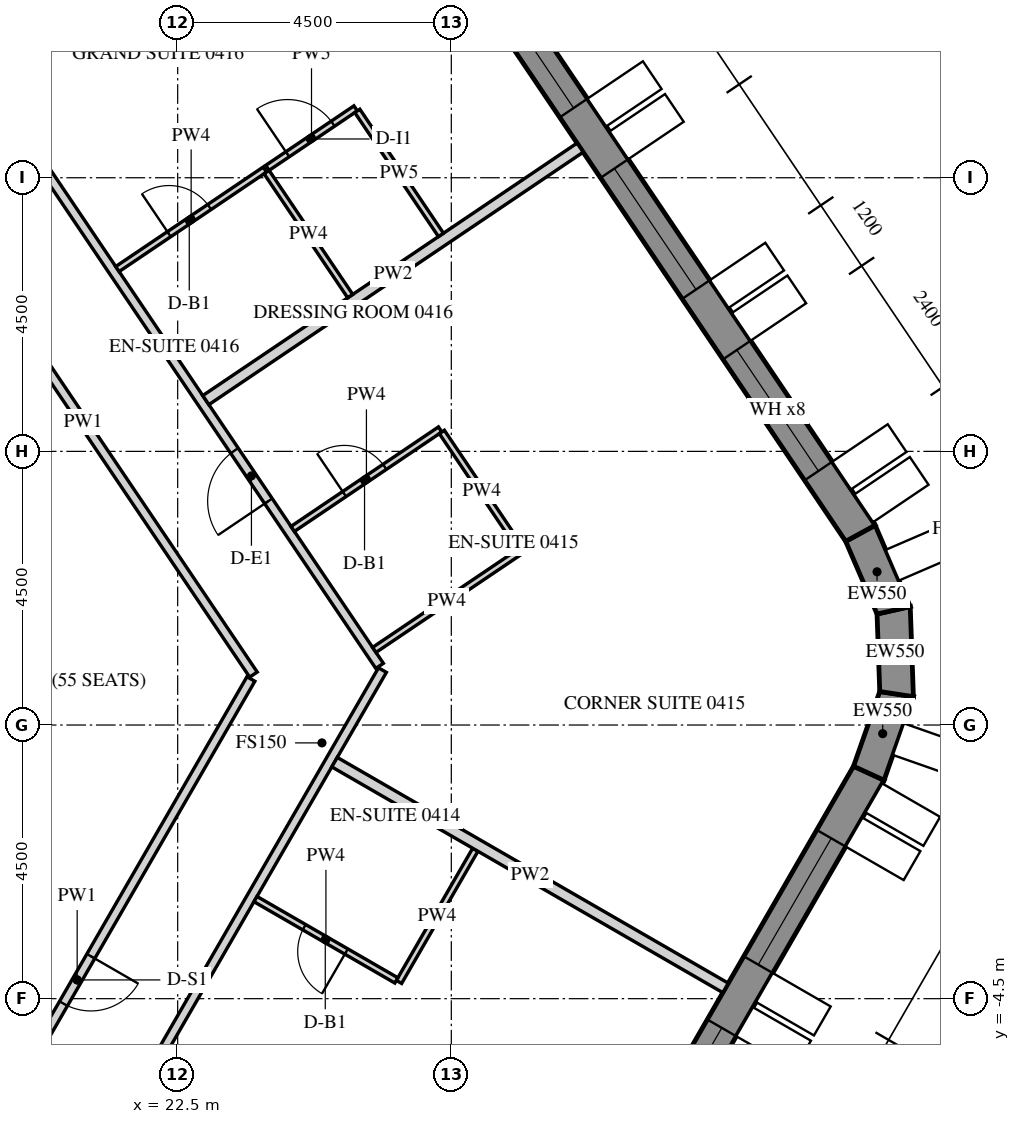
"""IFC4 building model, lengths in metres.
Left out: names, types, materials, properties, quantities, classifications, styles, units other than length and angle.
Written with IfcOpenShell. Run it as: python <this file> out.ifc"""

import sys

from ifc_helpers import new_model, si_unit, direction, frame, frame_2d, origin, place, context, subcontext, project, spatial, polyline, rectangle, outline, extrude, element, fill, save


model = new_model("IFC4")
c1 = context("Model", 3, precision=1e-05, world=origin(), true_north=direction((0.0, 1.0)))
c2 = subcontext(c1, "Body", "Model", "MODEL_VIEW")
j1 = project(units=[si_unit("LENGTHUNIT", "METRE"), si_unit("PLANEANGLEUNIT", "RADIAN")], contexts=[c1])
p1 = place(None, origin())
s1 = spatial("IfcSite", under=j1, at=p1, CompositionType="ELEMENT")
p2 = place(p1, origin())
s2 = spatial("IfcBuilding", under=s1, at=p2, CompositionType="ELEMENT")
p3 = place(p2, frame((0.0, 0.0, 68.7)))
s3 = spatial("IfcBuildingStorey", under=s2, at=p3, CompositionType="ELEMENT", Elevation=68.7)
p4 = place(p3, frame((18.83, -26.835, -0.15), z_axis=(0.0, 0.0, 1.0), x_axis=(0.500003800416, 0.866023209602, 0.0)))
e1 = element("IfcWall", 1, at=p4, inside=s3, PredefinedType="SOLIDWALL", context=c2, shape_type="SweptSolid", body=[
    extrude(outline(polyline([(-0.022, -0.275), (30.097, -0.275), (30.045, 0.275), (0.022, 0.275), (-0.022, -0.275)])), origin(), (0.0, 0.0, 1.0), 3.9),
])
p5 = place(p4, frame((1.236, 0.0, 1.05)))
e2 = element("IfcOpeningElement", 2, at=p5, cuts=e1, PredefinedType="OPENING", context=c2, shape_type="SweptSolid", body=[
    extrude(rectangle(XDim=2.4, YDim=2.4, at=frame_2d((1.2, 1.2))), frame((0.0, 0.285, 0.0), z_axis=(0.0, -1.0, 0.0), x_axis=(1.0, 0.0, 0.0)), (0.0, 0.0, 1.0), 0.57),
])
p6 = place(p4, frame((4.835, 0.0, 1.05)))
e3 = element("IfcOpeningElement", 3, at=p6, cuts=e1, PredefinedType="OPENING", context=c2, shape_type="SweptSolid", body=[
    extrude(rectangle(XDim=2.4, YDim=2.4, at=frame_2d((1.2, 1.2))), frame((0.0, 0.285, 0.0), z_axis=(0.0, -1.0, 0.0), x_axis=(1.0, 0.0, 0.0)), (0.0, 0.0, 1.0), 0.57),
])
p7 = place(p4, frame((8.436, 0.0, 1.05)))
e4 = element("IfcOpeningElement", 4, at=p7, cuts=e1, PredefinedType="OPENING", context=c2, shape_type="SweptSolid", body=[
    extrude(rectangle(XDim=2.4, YDim=2.4, at=frame_2d((1.2, 1.2))), frame((0.0, 0.285, 0.0), z_axis=(0.0, -1.0, 0.0), x_axis=(1.0, 0.0, 0.0)), (0.0, 0.0, 1.0), 0.57),
])
p8 = place(p4, frame((12.035, 0.0, 1.05)))
e5 = element("IfcOpeningElement", 5, at=p8, cuts=e1, PredefinedType="OPENING", context=c2, shape_type="SweptSolid", body=[
    extrude(rectangle(XDim=2.4, YDim=2.4, at=frame_2d((1.2, 1.2))), frame((0.0, 0.285, 0.0), z_axis=(0.0, -1.0, 0.0), x_axis=(1.0, 0.0, 0.0)), (0.0, 0.0, 1.0), 0.57),
])
p9 = place(p4, frame((15.635, 0.0, 1.05)))
e6 = element("IfcOpeningElement", 6, at=p9, cuts=e1, PredefinedType="OPENING", context=c2, shape_type="SweptSolid", body=[
    extrude(rectangle(XDim=2.4, YDim=2.4, at=frame_2d((1.2, 1.2))), frame((0.0, 0.285, 0.0), z_axis=(0.0, -1.0, 0.0), x_axis=(1.0, 0.0, 0.0)), (0.0, 0.0, 1.0), 0.57),
])
p10 = place(p4, frame((19.236, 0.0, 1.05)))
e7 = element("IfcOpeningElement", 7, at=p10, cuts=e1, PredefinedType="OPENING", context=c2, shape_type="SweptSolid", body=[
    extrude(rectangle(XDim=2.4, YDim=2.4, at=frame_2d((1.2, 1.2))), frame((0.0, 0.285, 0.0), z_axis=(0.0, -1.0, 0.0), x_axis=(1.0, 0.0, 0.0)), (0.0, 0.0, 1.0), 0.57),
])
p11 = place(p4, frame((22.835, 0.0, 1.05)))
e8 = element("IfcOpeningElement", 8, at=p11, cuts=e1, PredefinedType="OPENING", context=c2, shape_type="SweptSolid", body=[
    extrude(rectangle(XDim=2.4, YDim=2.4, at=frame_2d((1.2, 1.2))), frame((0.0, 0.285, 0.0), z_axis=(0.0, -1.0, 0.0), x_axis=(1.0, 0.0, 0.0)), (0.0, 0.0, 1.0), 0.57),
])
p12 = place(p4, frame((26.436, 0.0, 1.05)))
e9 = element("IfcOpeningElement", 9, at=p12, cuts=e1, PredefinedType="OPENING", context=c2, shape_type="SweptSolid", body=[
    extrude(rectangle(XDim=2.4, YDim=2.4, at=frame_2d((1.2, 1.2))), frame((0.0, 0.285, 0.0), z_axis=(0.0, -1.0, 0.0), x_axis=(1.0, 0.0, 0.0)), (0.0, 0.0, 1.0), 0.57),
])
p13 = place(p3, frame((33.866, -0.792, -0.15), z_axis=(0.0, 0.0, 1.0), x_axis=(0.33111537203, 0.943590276765, 0.0)))
e10 = element("IfcWall", 10, at=p13, inside=s3, PredefinedType="SOLIDWALL", context=c2, shape_type="SweptSolid", body=[
    extrude(outline(polyline([(-0.026, -0.275), (1.431, -0.275), (1.327, 0.275), (0.026, 0.275), (-0.026, -0.275)])), origin(), (0.0, 0.0, 1.0), 3.9),
])
p14 = place(p3, frame((34.323, 0.509, -0.15), z_axis=(0.0, 0.0, 1.0), x_axis=(-0.034876908462, 0.999391615562, 0.0)))
e11 = element("IfcWall", 11, at=p14, inside=s3, PredefinedType="SOLIDWALL", context=c2, shape_type="SweptSolid", body=[
    extrude(outline(polyline([(-0.052, -0.275), (1.431, -0.275), (1.327, 0.275), (0.052, 0.275), (-0.052, -0.275)])), origin(), (0.0, 0.0, 1.0), 3.9),
])
p15 = place(p3, frame((34.274, 1.887, -0.15), z_axis=(0.0, 0.0, 1.0), x_axis=(-0.396161342798, 0.918180913803, 0.0)))
e12 = element("IfcWall", 12, at=p15, inside=s3, PredefinedType="SOLIDWALL", context=c2, shape_type="SweptSolid", body=[
    extrude(outline(polyline([(-0.052, -0.275), (1.405, -0.275), (1.354, 0.275), (0.052, 0.275), (-0.052, -0.275)])), origin(), (0.0, 0.0, 1.0), 3.9),
])
p16 = place(p3, frame((33.728, 3.153, -0.15), z_axis=(0.0, 0.0, 1.0), x_axis=(-0.559192411416, 0.82903790445, 0.0)))
e13 = element("IfcWall", 13, at=p16, inside=s3, PredefinedType="SOLIDWALL", context=c2, shape_type="SweptSolid", body=[
    extrude(outline(polyline([(-0.026, -0.275), (30.093, -0.275), (30.048, 0.275), (0.026, 0.275), (-0.026, -0.275)])), origin(), (0.0, 0.0, 1.0), 3.9),
])
p17 = place(p16, frame((1.236, 0.0, 1.05)))
e14 = element("IfcOpeningElement", 14, at=p17, cuts=e13, PredefinedType="OPENING", context=c2, shape_type="SweptSolid", body=[
    extrude(rectangle(XDim=2.4, YDim=2.4, at=frame_2d((1.2, 1.2))), frame((0.0, 0.285, 0.0), z_axis=(0.0, -1.0, 0.0), x_axis=(1.0, 0.0, 0.0)), (0.0, 0.0, 1.0), 0.57),
])
p18 = place(p16, frame((4.835, 0.0, 1.05)))
e15 = element("IfcOpeningElement", 15, at=p18, cuts=e13, PredefinedType="OPENING", context=c2, shape_type="SweptSolid", body=[
    extrude(rectangle(XDim=2.4, YDim=2.4, at=frame_2d((1.2, 1.2))), frame((0.0, 0.285, 0.0), z_axis=(0.0, -1.0, 0.0), x_axis=(1.0, 0.0, 0.0)), (0.0, 0.0, 1.0), 0.57),
])
p19 = place(p16, frame((8.436, 0.0, 1.05)))
e16 = element("IfcOpeningElement", 16, at=p19, cuts=e13, PredefinedType="OPENING", context=c2, shape_type="SweptSolid", body=[
    extrude(rectangle(XDim=2.4, YDim=2.4, at=frame_2d((1.2, 1.2))), frame((0.0, 0.285, 0.0), z_axis=(0.0, -1.0, 0.0), x_axis=(1.0, 0.0, 0.0)), (0.0, 0.0, 1.0), 0.57),
])
p20 = place(p16, frame((12.035, 0.0, 1.05)))
e17 = element("IfcOpeningElement", 17, at=p20, cuts=e13, PredefinedType="OPENING", context=c2, shape_type="SweptSolid", body=[
    extrude(rectangle(XDim=2.4, YDim=2.4, at=frame_2d((1.2, 1.2))), frame((0.0, 0.285, 0.0), z_axis=(0.0, -1.0, 0.0), x_axis=(1.0, 0.0, 0.0)), (0.0, 0.0, 1.0), 0.57),
])
p21 = place(p16, frame((15.635, 0.0, 1.05)))
e18 = element("IfcOpeningElement", 18, at=p21, cuts=e13, PredefinedType="OPENING", context=c2, shape_type="SweptSolid", body=[
    extrude(rectangle(XDim=2.4, YDim=2.4, at=frame_2d((1.2, 1.2))), frame((0.0, 0.285, 0.0), z_axis=(0.0, -1.0, 0.0), x_axis=(1.0, 0.0, 0.0)), (0.0, 0.0, 1.0), 0.57),
])
p22 = place(p16, frame((19.236, 0.0, 1.05)))
e19 = element("IfcOpeningElement", 19, at=p22, cuts=e13, PredefinedType="OPENING", context=c2, shape_type="SweptSolid", body=[
    extrude(rectangle(XDim=2.4, YDim=2.4, at=frame_2d((1.2, 1.2))), frame((0.0, 0.285, 0.0), z_axis=(0.0, -1.0, 0.0), x_axis=(1.0, 0.0, 0.0)), (0.0, 0.0, 1.0), 0.57),
])
p23 = place(p16, frame((22.835, 0.0, 1.05)))
e20 = element("IfcOpeningElement", 20, at=p23, cuts=e13, PredefinedType="OPENING", context=c2, shape_type="SweptSolid", body=[
    extrude(rectangle(XDim=2.4, YDim=2.4, at=frame_2d((1.2, 1.2))), frame((0.0, 0.285, 0.0), z_axis=(0.0, -1.0, 0.0), x_axis=(1.0, 0.0, 0.0)), (0.0, 0.0, 1.0), 0.57),
])
p24 = place(p16, frame((26.436, 0.0, 1.05)))
e21 = element("IfcOpeningElement", 21, at=p24, cuts=e13, PredefinedType="OPENING", context=c2, shape_type="SweptSolid", body=[
    extrude(rectangle(XDim=2.4, YDim=2.4, at=frame_2d((1.2, 1.2))), frame((0.0, 0.285, 0.0), z_axis=(0.0, -1.0, 0.0), x_axis=(1.0, 0.0, 0.0)), (0.0, 0.0, 1.0), 0.57),
])
p25 = place(p3, frame((13.928, -19.775, 0.0), z_axis=(0.0, 0.0, 1.0), x_axis=(0.50000450071, 0.866022805283, 0.0)))
e22 = element("IfcWall", 22, at=p25, inside=s3, PredefinedType="PARTITIONING", context=c2, shape_type="SweptSolid", body=[
    extrude(rectangle(XDim=23.877, YDim=0.15, at=frame_2d((11.938, 0.0))), origin(), (0.0, 0.0, 1.0), 2.988),
])
p26 = place(p25, frame((3.943, 0.0, 0.0)))
e23 = element("IfcOpeningElement", 23, at=p26, cuts=e22, PredefinedType="OPENING", context=c2, shape_type="SweptSolid", body=[
    extrude(rectangle(XDim=1.0, YDim=2.1, at=frame_2d((0.5, 1.05))), frame((0.0, 0.085, 0.0), z_axis=(0.0, -1.0, 0.0), x_axis=(1.0, 0.0, 0.0)), (0.0, 0.0, 1.0), 0.17),
])
p27 = place(p25, frame((14.972, 0.0, 0.0)))
e24 = element("IfcOpeningElement", 24, at=p27, cuts=e22, PredefinedType="OPENING", context=c2, shape_type="SweptSolid", body=[
    extrude(rectangle(XDim=1.0, YDim=2.1, at=frame_2d((0.5, 1.05))), frame((0.0, 0.085, 0.0), z_axis=(0.0, -1.0, 0.0), x_axis=(1.0, 0.0, 0.0)), (0.0, 0.0, 1.0), 0.17),
])
p28 = place(p3, frame((25.821, 0.972, 0.0), z_axis=(0.0, 0.0, 1.0), x_axis=(-0.559193816298, 0.829036956845, 0.0)))
e25 = element("IfcWall", 25, at=p28, inside=s3, PredefinedType="PARTITIONING", context=c2, shape_type="SweptSolid", body=[
    extrude(rectangle(XDim=22.002, YDim=0.15, at=frame_2d((11.001, 0.0))), origin(), (0.0, 0.0, 1.0), 2.988),
])
p29 = place(p28, frame((3.269, 0.0, 0.0)))
e26 = element("IfcOpeningElement", 26, at=p29, cuts=e25, PredefinedType="OPENING", context=c2, shape_type="SweptSolid", body=[
    extrude(rectangle(XDim=1.0, YDim=2.1, at=frame_2d((0.5, 1.05))), frame((0.0, 0.085, 0.0), z_axis=(0.0, -1.0, 0.0), x_axis=(1.0, 0.0, 0.0)), (0.0, 0.0, 1.0), 0.17),
])
p30 = place(p28, frame((13.221, 0.0, 0.0)))
e27 = element("IfcOpeningElement", 27, at=p30, cuts=e25, PredefinedType="OPENING", context=c2, shape_type="SweptSolid", body=[
    extrude(rectangle(XDim=1.0, YDim=2.1, at=frame_2d((0.5, 1.05))), frame((0.0, 0.085, 0.0), z_axis=(0.0, -1.0, 0.0), x_axis=(1.0, 0.0, 0.0)), (0.0, 0.0, 1.0), 0.17),
])
p31 = place(p28, frame((20.852, 0.0, 0.0)))
e28 = element("IfcOpeningElement", 28, at=p31, cuts=e25, PredefinedType="OPENING", context=c2, shape_type="SweptSolid", body=[
    extrude(rectangle(XDim=1.0, YDim=2.1, at=frame_2d((0.5, 1.05))), frame((0.0, 0.085, 0.0), z_axis=(0.0, -1.0, 0.0), x_axis=(1.0, 0.0, 0.0)), (0.0, 0.0, 1.0), 0.17),
])
p32 = place(p3, frame((18.14, 9.141, 0.0), z_axis=(0.0, 0.0, 1.0), x_axis=(0.55918799196, -0.829040885389, 0.0)))
e29 = element("IfcWall", 29, at=p32, inside=s3, PredefinedType="PARTITIONING", context=c2, shape_type="SweptSolid", body=[
    extrude(rectangle(XDim=10.025, YDim=0.15, at=frame_2d((5.013, 0.0))), origin(), (0.0, 0.0, 1.0), 2.988),
])
p33 = place(p3, frame((23.704, 0.757, 0.0), z_axis=(0.0, 0.0, 1.0), x_axis=(-0.500010297365, -0.866019458516, 0.0)))
e30 = element("IfcWall", 30, at=p33, inside=s3, PredefinedType="PARTITIONING", context=c2, shape_type="SweptSolid", body=[
    extrude(rectangle(XDim=11.429, YDim=0.15, at=frame_2d((5.714, 0.0))), origin(), (0.0, 0.0, 1.0), 2.988),
])
p34 = place(p33, frame((5.264, 0.0, 0.0)))
e31 = element("IfcOpeningElement", 31, at=p34, cuts=e30, PredefinedType="OPENING", context=c2, shape_type="SweptSolid", body=[
    extrude(rectangle(XDim=0.9, YDim=2.1, at=frame_2d((0.45, 1.05))), frame((0.0, 0.085, 0.0), z_axis=(0.0, -1.0, 0.0), x_axis=(1.0, 0.0, 0.0)), (0.0, 0.0, 1.0), 0.17),
])
p35 = place(p3, frame((27.395, -2.051, 0.0), z_axis=(0.0, 0.0, 1.0), x_axis=(-0.50001992892, -0.866013897511, 0.0)))
e32 = element("IfcWall", 32, at=p35, inside=s3, PredefinedType="PARTITIONING", context=c2, shape_type="SweptSolid", body=[
    extrude(rectangle(XDim=2.51, YDim=0.1, at=frame_2d((1.255, 0.0))), origin(), (0.0, 0.0, 1.0), 2.988),
])
p36 = place(p3, frame((26.096, -4.2, 0.0), z_axis=(0.0, 0.0, 1.0), x_axis=(-0.86604424267, 0.499967368674, 0.0)))
e33 = element("IfcWall", 33, at=p36, inside=s3, PredefinedType="PARTITIONING", context=c2, shape_type="SweptSolid", body=[
    extrude(rectangle(XDim=2.675, YDim=0.1, at=frame_2d((1.337, 0.0))), origin(), (0.0, 0.0, 1.0), 2.988),
])
p37 = place(p36, frame((0.95, 0.0, 0.0)))
e34 = element("IfcOpeningElement", 34, at=p37, cuts=e33, PredefinedType="OPENING", context=c2, shape_type="SweptSolid", body=[
    extrude(rectangle(XDim=0.8, YDim=2.1, at=frame_2d((0.4, 1.05))), frame((0.0, 0.06, 0.0), z_axis=(0.0, -1.0, 0.0), x_axis=(1.0, 0.0, 0.0)), (0.0, 0.0, 1.0), 0.12),
])
p38 = place(p3, frame((31.51, -4.323, 0.0), z_axis=(0.0, 0.0, 1.0), x_axis=(-0.866028983062, 0.499993800457, 0.0)))
e35 = element("IfcWall", 35, at=p38, inside=s3, PredefinedType="PARTITIONING", context=c2, shape_type="SweptSolid", body=[
    extrude(rectangle(XDim=7.425, YDim=0.18, at=frame_2d((3.712, 0.0))), origin(), (0.0, 0.0, 1.0), 2.988),
])
p39 = place(p3, frame((24.392, 3.225, 0.0), z_axis=(0.0, 0.0, 1.0), x_axis=(0.829033436212, 0.559199035802, 0.0)))
e36 = element("IfcWall", 36, at=p39, inside=s3, PredefinedType="PARTITIONING", context=c2, shape_type="SweptSolid", body=[
    extrude(rectangle(XDim=2.925, YDim=0.1, at=frame_2d((1.462, 0.0))), origin(), (0.0, 0.0, 1.0), 2.988),
])
p40 = place(p39, frame((1.025, 0.0, 0.0)))
e37 = element("IfcOpeningElement", 37, at=p40, cuts=e36, PredefinedType="OPENING", context=c2, shape_type="SweptSolid", body=[
    extrude(rectangle(XDim=0.8, YDim=2.1, at=frame_2d((0.4, 1.05))), frame((0.0, 0.06, 0.0), z_axis=(0.0, -1.0, 0.0), x_axis=(1.0, 0.0, 0.0)), (0.0, 0.0, 1.0), 0.12),
])
p41 = place(p3, frame((26.844, 4.819, 0.0), z_axis=(0.0, 0.0, 1.0), x_axis=(0.559223037199, -0.829017246302, 0.0)))
e38 = element("IfcWall", 38, at=p41, inside=s3, PredefinedType="PARTITIONING", context=c2, shape_type="SweptSolid", body=[
    extrude(rectangle(XDim=2.35, YDim=0.1, at=frame_2d((1.175, 0.0))), origin(), (0.0, 0.0, 1.0), 2.988),
])
p42 = place(p3, frame((28.117, 2.843, 0.0), z_axis=(0.0, 0.0, 1.0), x_axis=(-0.82904649496, -0.559179675234, 0.0)))
e39 = element("IfcWall", 39, at=p42, inside=s3, PredefinedType="PARTITIONING", context=c2, shape_type="SweptSolid", body=[
    extrude(rectangle(XDim=2.875, YDim=0.1, at=frame_2d((1.438, 0.0))), origin(), (0.0, 0.0, 1.0), 2.988),
])
p43 = place(p3, frame((29.119, 9.495, 0.0), z_axis=(0.0, 0.0, 1.0), x_axis=(-0.829038452737, -0.559191598545, 0.0)))
e40 = element("IfcWall", 40, at=p43, inside=s3, PredefinedType="PARTITIONING", context=c2, shape_type="SweptSolid", body=[
    extrude(rectangle(XDim=7.425, YDim=0.18, at=frame_2d((3.713, 0.0))), origin(), (0.0, 0.0, 1.0), 2.988),
])
p44 = place(p3, frame((21.509, 7.499, 0.0), z_axis=(0.0, 0.0, 1.0), x_axis=(0.829033436212, 0.559199035802, 0.0)))
e41 = element("IfcWall", 41, at=p44, inside=s3, PredefinedType="PARTITIONING", context=c2, shape_type="SweptSolid", body=[
    extrude(rectangle(XDim=2.925, YDim=0.1, at=frame_2d((1.462, 0.0))), origin(), (0.0, 0.0, 1.0), 2.988),
])
p45 = place(p44, frame((1.025, 0.0, 0.0)))
e42 = element("IfcOpeningElement", 42, at=p45, cuts=e41, PredefinedType="OPENING", context=c2, shape_type="SweptSolid", body=[
    extrude(rectangle(XDim=0.8, YDim=2.1, at=frame_2d((0.4, 1.05))), frame((0.0, 0.06, 0.0), z_axis=(0.0, -1.0, 0.0), x_axis=(1.0, 0.0, 0.0)), (0.0, 0.0, 1.0), 0.12),
])
p46 = place(p3, frame((23.975, 9.162, 0.0), z_axis=(0.0, 0.0, 1.0), x_axis=(0.829011970545, 0.559230858138, 0.0)))
e43 = element("IfcWall", 43, at=p46, inside=s3, PredefinedType="PARTITIONING", context=c2, shape_type="SweptSolid", body=[
    extrude(rectangle(XDim=1.75, YDim=0.1, at=frame_2d((0.875, 0.0))), origin(), (0.0, 0.0, 1.0), 2.988),
])
p47 = place(p46, frame((0.4, 0.0, 0.0)))
e44 = element("IfcOpeningElement", 44, at=p47, cuts=e43, PredefinedType="OPENING", context=c2, shape_type="SweptSolid", body=[
    extrude(rectangle(XDim=0.9, YDim=2.1, at=frame_2d((0.45, 1.05))), frame((0.0, 0.06, 0.0), z_axis=(0.0, -1.0, 0.0), x_axis=(1.0, 0.0, 0.0)), (0.0, 0.0, 1.0), 0.12),
])
for number, where, z_axis, x_axis in (
    (45, (25.454, 10.099, 0.0), (0.0, 0.0, 1.0), (0.559, -0.829, 0.0)),
    (46, (25.338, 7.053, 0.0), (0.0, 0.0, 1.0), (-0.559, 0.829, 0.0)),
):
    element("IfcWall", number, at=place(p3, frame(where, z_axis=z_axis, x_axis=x_axis)), inside=s3, PredefinedType="PARTITIONING", context=c2, shape_type="SweptSolid", body=[
        extrude(rectangle(XDim=2.46, YDim=0.1, at=frame_2d((1.23, 0.0))), origin(), (0.0, 0.0, 1.0), 2.988),
    ])
p48 = place(p11, frame((0.0, 0.205, 0.0)))
e47 = element("IfcWindow", 47, at=p48, inside=s3, PartitioningType="DOUBLE_PANEL_VERTICAL", PredefinedType="WINDOW", context=c2, shape_type="SweptSolid", body=[
    extrude(rectangle(XDim=2.4, YDim=2.4, at=frame_2d((1.2, 1.2))), frame((0.0, 0.03, 0.0), z_axis=(0.0, -1.0, 0.0), x_axis=(1.0, 0.0, 0.0)), (0.0, 0.0, 1.0), 0.06),
])
fill(e8, e47)
p49 = place(p12, frame((0.0, 0.205, 0.0)))
e48 = element("IfcWindow", 48, at=p49, inside=s3, PartitioningType="DOUBLE_PANEL_VERTICAL", PredefinedType="WINDOW", context=c2, shape_type="SweptSolid", body=[
    extrude(rectangle(XDim=2.4, YDim=2.4, at=frame_2d((1.2, 1.2))), frame((0.0, 0.03, 0.0), z_axis=(0.0, -1.0, 0.0), x_axis=(1.0, 0.0, 0.0)), (0.0, 0.0, 1.0), 0.06),
])
fill(e9, e48)
p50 = place(p17, frame((0.0, 0.205, 0.0)))
e49 = element("IfcWindow", 49, at=p50, inside=s3, PartitioningType="DOUBLE_PANEL_VERTICAL", PredefinedType="WINDOW", context=c2, shape_type="SweptSolid", body=[
    extrude(rectangle(XDim=2.4, YDim=2.4, at=frame_2d((1.2, 1.2))), frame((0.0, 0.03, 0.0), z_axis=(0.0, -1.0, 0.0), x_axis=(1.0, 0.0, 0.0)), (0.0, 0.0, 1.0), 0.06),
])
fill(e14, e49)
p51 = place(p18, frame((0.0, 0.205, 0.0)))
e50 = element("IfcWindow", 50, at=p51, inside=s3, PartitioningType="DOUBLE_PANEL_VERTICAL", PredefinedType="WINDOW", context=c2, shape_type="SweptSolid", body=[
    extrude(rectangle(XDim=2.4, YDim=2.4, at=frame_2d((1.2, 1.2))), frame((0.0, 0.03, 0.0), z_axis=(0.0, -1.0, 0.0), x_axis=(1.0, 0.0, 0.0)), (0.0, 0.0, 1.0), 0.06),
])
fill(e15, e50)
p52 = place(p19, frame((0.0, 0.205, 0.0)))
e51 = element("IfcWindow", 51, at=p52, inside=s3, PartitioningType="DOUBLE_PANEL_VERTICAL", PredefinedType="WINDOW", context=c2, shape_type="SweptSolid", body=[
    extrude(rectangle(XDim=2.4, YDim=2.4, at=frame_2d((1.2, 1.2))), frame((0.0, 0.03, 0.0), z_axis=(0.0, -1.0, 0.0), x_axis=(1.0, 0.0, 0.0)), (0.0, 0.0, 1.0), 0.06),
])
fill(e16, e51)
p53 = place(p37, origin())
e52 = element("IfcDoor", 52, at=p53, inside=s3, OperationType="SINGLE_SWING_LEFT", PredefinedType="DOOR", context=c2, shape_type="SweptSolid", body=[
    extrude(rectangle(XDim=0.8, YDim=2.1, at=frame_2d((0.4, 1.05))), frame((0.0, 0.025, 0.0), z_axis=(0.0, -1.0, 0.0), x_axis=(1.0, 0.0, 0.0)), (0.0, 0.0, 1.0), 0.05),
])
fill(e34, e52)
p54 = place(p29, origin())
e53 = element("IfcDoor", 53, at=p54, inside=s3, OperationType="SINGLE_SWING_LEFT", PredefinedType="DOOR", context=c2, shape_type="SweptSolid", body=[
    extrude(rectangle(XDim=1.0, YDim=2.1, at=frame_2d((0.5, 1.05))), frame((0.0, 0.025, 0.0), z_axis=(0.0, -1.0, 0.0), x_axis=(1.0, 0.0, 0.0)), (0.0, 0.0, 1.0), 0.05),
])
fill(e26, e53)
p55 = place(p40, origin())
e54 = element("IfcDoor", 54, at=p55, inside=s3, OperationType="SINGLE_SWING_RIGHT", PredefinedType="DOOR", context=c2, shape_type="SweptSolid", body=[
    extrude(rectangle(XDim=0.8, YDim=2.1, at=frame_2d((0.4, 1.05))), frame((0.0, 0.025, 0.0), z_axis=(0.0, -1.0, 0.0), x_axis=(1.0, 0.0, 0.0)), (0.0, 0.0, 1.0), 0.05),
])
fill(e37, e54)
p56 = place(p45, origin())
e55 = element("IfcDoor", 55, at=p56, inside=s3, OperationType="SINGLE_SWING_RIGHT", PredefinedType="DOOR", context=c2, shape_type="SweptSolid", body=[
    extrude(rectangle(XDim=0.8, YDim=2.1, at=frame_2d((0.4, 1.05))), frame((0.0, 0.025, 0.0), z_axis=(0.0, -1.0, 0.0), x_axis=(1.0, 0.0, 0.0)), (0.0, 0.0, 1.0), 0.05),
])
fill(e42, e55)
p57 = place(p47, origin())
e56 = element("IfcDoor", 56, at=p57, inside=s3, OperationType="SINGLE_SWING_LEFT", PredefinedType="DOOR", context=c2, shape_type="SweptSolid", body=[
    extrude(rectangle(XDim=0.9, YDim=2.1, at=frame_2d((0.45, 1.05))), frame((0.0, 0.025, 0.0), z_axis=(0.0, -1.0, 0.0), x_axis=(1.0, 0.0, 0.0)), (0.0, 0.0, 1.0), 0.05),
])
fill(e44, e56)
p58 = place(p34, origin())
e57 = element("IfcDoor", 57, at=p58, inside=s3, OperationType="SINGLE_SWING_LEFT", PredefinedType="DOOR", context=c2, shape_type="SweptSolid", body=[
    extrude(rectangle(XDim=0.9, YDim=2.1, at=frame_2d((0.45, 1.05))), frame((0.0, 0.025, 0.0), z_axis=(0.0, -1.0, 0.0), x_axis=(1.0, 0.0, 0.0)), (0.0, 0.0, 1.0), 0.05),
])
fill(e31, e57)
save(model, sys.argv[1])
